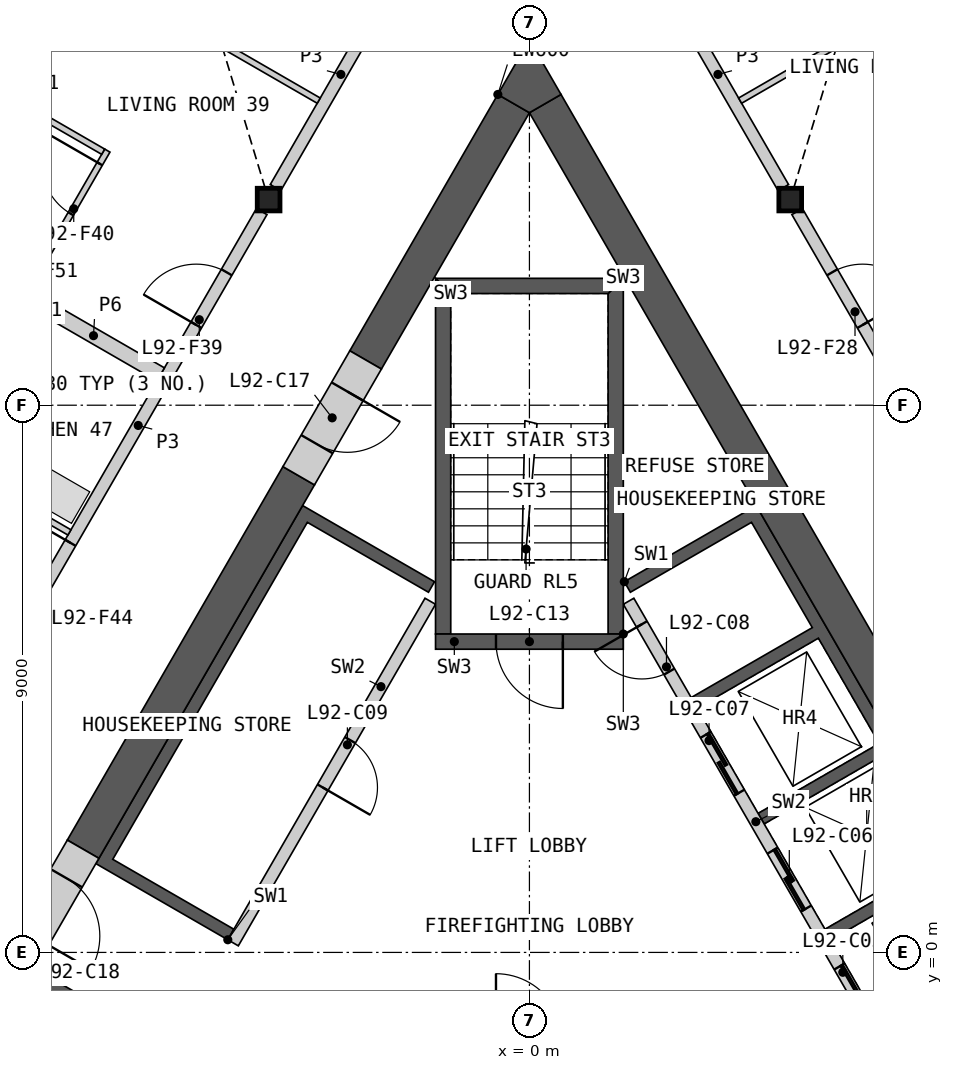
"""IFC4 building model, lengths in metres.
Left out: names, types, materials, properties, quantities, classifications, styles, units other than length and angle.
Written with IfcOpenShell. Run it as: python <this file> out.ifc"""

import sys

from ifc_helpers import new_model, si_unit, direction, frame, frame_2d, origin, origin_2d, place, context, subcontext, project, spatial, polyline, rectangle, i_section, outline, extrude, element, fill, save


model = new_model("IFC4")
c1 = context("Model", 3, precision=1e-05, world=origin(), true_north=direction((0.0, 1.0)))
c2 = subcontext(c1, "Body", "Model", "MODEL_VIEW")
j1 = project(units=[si_unit("LENGTHUNIT", "METRE"), si_unit("PLANEANGLEUNIT", "RADIAN")], contexts=[c1])
p1 = place(None, origin())
s1 = spatial("IfcSite", under=j1, at=p1, CompositionType="ELEMENT")
p2 = place(p1, origin())
s2 = spatial("IfcBuilding", under=s1, at=p2, CompositionType="ELEMENT")
p3 = place(p2, frame((0.0, 0.0, 401.8)))
s3 = spatial("IfcBuildingStorey", under=s2, at=p3, CompositionType="ELEMENT", Elevation=401.8)
for number, where, z_axis, x_axis in (
    (1, (-4.289, 12.382, 0.0), (0.0, 0.0, 1.0), (1.0, 0.0, 0.0)),
    (2, (4.289, 12.382, 0.0), (0.0, 0.0, 1.0), (1.0, 0.0, 0.0)),
):
    element("IfcColumn", number, at=place(p3, frame(where, z_axis=z_axis, x_axis=x_axis)), inside=s3, PredefinedType="COLUMN", context=c2, shape_type="SweptSolid", body=[
        extrude(i_section(OverallWidth=0.374, OverallDepth=0.372, WebThickness=0.016, FlangeThickness=0.026, at=origin_2d()), origin(), (0.0, 0.0, 1.0), 3.4),
    ])
p4 = place(p3, origin())
e3 = element("IfcWall", 3, at=p4, inside=s3, PredefinedType="SHEAR", context=c2, shape_type="SweptSolid", body=[
    extrude(outline(polyline([(1.561, 6.097), (3.731, 7.35), (8.231, -0.444), (6.061, -1.697), (5.96, -1.524), (7.952, -0.374), (6.952, 1.358), (4.96, 0.208), (4.861, 0.381), (6.852, 1.531), (5.852, 3.263), (3.861, 2.113), (3.76, 2.287), (5.752, 3.437), (4.752, 5.169), (2.76, 4.019), (2.66, 4.192), (4.652, 5.342), (3.652, 7.074), (1.66, 5.924), (1.561, 6.097)])), origin(), (0.0, 0.0, 1.0), 3.1),
])
p5 = place(p3, frame((5.817, -1.476, 0.0), z_axis=(0.0, 0.0, 1.0), x_axis=(-0.500002616675, 0.866023893041, 0.0)))
e4 = element("IfcWall", 4, at=p5, inside=s3, PredefinedType="SOLIDWALL", context=c2, shape_type="SweptSolid", body=[
    extrude(rectangle(XDim=8.373, YDim=0.2, at=frame_2d((4.187, 0.0))), origin(), (0.0, 0.0, 1.0), 3.1),
])
p6 = place(p5, frame((0.337, 0.0, 0.0)))
e5 = element("IfcOpeningElement", 5, at=p6, cuts=e4, PredefinedType="OPENING", context=c2, shape_type="SweptSolid", body=[
    extrude(rectangle(XDim=1.1, YDim=2.1, at=frame_2d((0.55, 1.05))), frame((0.0, 0.11, 0.0), z_axis=(0.0, -1.0, 0.0), x_axis=(1.0, 0.0, 0.0)), (0.0, 0.0, 1.0), 0.22),
])
p7 = place(p5, frame((2.537, 0.0, 0.0)))
e6 = element("IfcOpeningElement", 6, at=p7, cuts=e4, PredefinedType="OPENING", context=c2, shape_type="SweptSolid", body=[
    extrude(rectangle(XDim=1.1, YDim=2.1, at=frame_2d((0.55, 1.05))), frame((0.0, 0.11, 0.0), z_axis=(0.0, -1.0, 0.0), x_axis=(1.0, 0.0, 0.0)), (0.0, 0.0, 1.0), 0.22),
])
p8 = place(p5, frame((4.737, 0.0, 0.0)))
e7 = element("IfcOpeningElement", 7, at=p8, cuts=e4, PredefinedType="OPENING", context=c2, shape_type="SweptSolid", body=[
    extrude(rectangle(XDim=1.1, YDim=2.1, at=frame_2d((0.55, 1.05))), frame((0.0, 0.11, 0.0), z_axis=(0.0, -1.0, 0.0), x_axis=(1.0, 0.0, 0.0)), (0.0, 0.0, 1.0), 0.22),
])
p9 = place(p5, frame((7.037, 0.0, 0.0)))
e8 = element("IfcOpeningElement", 8, at=p9, cuts=e4, PredefinedType="OPENING", context=c2, shape_type="SweptSolid", body=[
    extrude(rectangle(XDim=0.9, YDim=2.1, at=frame_2d((0.45, 1.05))), frame((0.0, 0.11, 0.0), z_axis=(0.0, -1.0, 0.0), x_axis=(1.0, 0.0, 0.0)), (0.0, 0.0, 1.0), 0.22),
])
p10 = place(p3, origin())
e9 = element("IfcWall", 9, at=p10, inside=s3, PredefinedType="SHEAR", context=c2, shape_type="SweptSolid", body=[
    extrude(outline(polyline([(-6.061, -1.697), (-8.231, -0.444), (-8.131, -0.271), (-5.96, -1.524), (-6.061, -1.697)])), origin(), (0.0, 0.0, 1.0), 3.1),
])
p11 = place(p3, origin())
e10 = element("IfcWall", 10, at=p11, inside=s3, PredefinedType="SHEAR", context=c2, shape_type="SweptSolid", body=[
    extrude(outline(polyline([(-4.96, 0.208), (-7.131, 1.461), (-3.731, 7.35), (-1.561, 6.097), (-1.66, 5.924), (-3.652, 7.074), (-6.852, 1.531), (-4.861, 0.381), (-4.96, 0.208)])), origin(), (0.0, 0.0, 1.0), 3.1),
])
p12 = place(p3, frame((-1.631, 5.776, 0.0), z_axis=(0.0, 0.0, 1.0), x_axis=(-0.499992876559, -0.866029516466, 0.0)))
e11 = element("IfcWall", 11, at=p12, inside=s3, PredefinedType="SOLIDWALL", context=c2, shape_type="SweptSolid", body=[
    extrude(rectangle(XDim=6.486, YDim=0.2, at=frame_2d((3.243, 0.0))), origin(), (0.0, 0.0, 1.0), 3.1),
])
p13 = place(p12, frame((2.637, 0.0, 0.0)))
e12 = element("IfcOpeningElement", 12, at=p13, cuts=e11, PredefinedType="OPENING", context=c2, shape_type="SweptSolid", body=[
    extrude(rectangle(XDim=0.9, YDim=2.1, at=frame_2d((0.45, 1.05))), frame((0.0, 0.11, 0.0), z_axis=(0.0, -1.0, 0.0), x_axis=(1.0, 0.0, 0.0)), (0.0, 0.0, 1.0), 0.22),
])
p14 = place(p3, origin())
e13 = element("IfcWall", 13, at=p14, inside=s3, PredefinedType="SHEAR", context=c2, shape_type="SweptSolid", body=[
    extrude(outline(polyline([(1.544, 5.237), (1.544, 11.087), (1.294, 10.837), (1.294, 5.237), (1.544, 5.237)])), origin(), (0.0, 0.0, 1.0), 3.1),
])
p15 = place(p3, origin())
e14 = element("IfcWall", 14, at=p15, inside=s3, PredefinedType="SHEAR", context=c2, shape_type="SweptSolid", body=[
    extrude(outline(polyline([(1.544, 11.087), (-1.544, 11.087), (-1.294, 10.837), (1.294, 10.837), (1.544, 11.087)])), origin(), (0.0, 0.0, 1.0), 3.1),
])
p16 = place(p3, origin())
e15 = element("IfcWall", 15, at=p16, inside=s3, PredefinedType="SHEAR", context=c2, shape_type="SweptSolid", body=[
    extrude(outline(polyline([(-1.294, 10.837), (-1.544, 11.087), (-1.544, 5.237), (-1.294, 5.237), (-1.294, 10.837)])), origin(), (0.0, 0.0, 1.0), 3.1),
])
p17 = place(p3, frame((1.544, 5.112, 0.0), z_axis=(0.0, 0.0, 1.0), x_axis=(-1.0, 0.0, 0.0)))
e16 = element("IfcWall", 16, at=p17, inside=s3, PredefinedType="SHEAR", context=c2, shape_type="SweptSolid", body=[
    extrude(rectangle(XDim=3.088, YDim=0.25, at=frame_2d((1.544, 0.0))), origin(), (0.0, 0.0, 1.0), 3.1),
])
p18 = place(p17, frame((0.994, 0.0, 0.0)))
e17 = element("IfcOpeningElement", 17, at=p18, cuts=e16, PredefinedType="OPENING", context=c2, shape_type="SweptSolid", body=[
    extrude(rectangle(XDim=1.1, YDim=2.1, at=frame_2d((0.55, 1.05))), frame((0.0, 0.135, 0.0), z_axis=(0.0, -1.0, 0.0), x_axis=(1.0, 0.0, 0.0)), (0.0, 0.0, 1.0), 0.27),
])
p19 = place(p3, frame((8.686, -0.634, 0.0), z_axis=(0.0, 0.0, 1.0), x_axis=(-0.500004601921, 0.866022746848, 0.0)))
e18 = element("IfcWall", 18, at=p19, inside=s3, PredefinedType="SHEAR", context=c2, shape_type="SweptSolid", body=[
    extrude(rectangle(XDim=16.853, YDim=0.6, at=frame_2d((8.426, 0.0))), origin(), (0.0, 0.0, 1.0), 3.1),
])
p20 = place(p3, frame((-3.794, 7.84, 0.0), z_axis=(0.0, 0.0, 1.0), x_axis=(-0.499974747889, -0.866039982607, 0.0)))
e19 = element("IfcWall", 19, at=p20, inside=s3, PredefinedType="SHEAR", context=c2, shape_type="SweptSolid", body=[
    extrude(rectangle(XDim=7.092, YDim=0.6, at=frame_2d((3.546, 0.0))), origin(), (0.0, 0.0, 1.0), 3.1),
])
p21 = place(p3, frame((-0.26, 13.961, 0.0), z_axis=(0.0, 0.0, 1.0), x_axis=(-0.50000604952, -0.866021911064, 0.0)))
e20 = element("IfcWall", 20, at=p21, inside=s3, PredefinedType="SHEAR", context=c2, shape_type="SweptSolid", body=[
    extrude(rectangle(XDim=4.869, YDim=0.6, at=frame_2d((2.434, 0.0))), origin(), (0.0, 0.0, 1.0), 3.1),
])
p22 = place(p3, origin())
e21 = element("IfcWall", 21, at=p22, inside=s3, PredefinedType="SHEAR", context=c2, shape_type="SweptSolid", body=[
    extrude(outline(polyline([(-0.52, 14.111), (0.0, 15.011), (0.52, 14.111), (0.0, 13.811), (-0.52, 14.111)])), origin(), (0.0, 0.0, 1.0), 3.1),
])
p23 = place(p3, frame((-2.694, 9.745, 0.0), z_axis=(0.0, 0.0, 1.0), x_axis=(-0.50002983664, -0.866008176907, 0.0)))
e22 = element("IfcWall", 22, at=p23, inside=s3, PredefinedType="SHEAR", context=c2, shape_type="SweptSolid", body=[
    extrude(rectangle(XDim=2.2, YDim=0.6, at=frame_2d((1.1, 0.0))), origin(), (0.0, 0.0, 1.0), 3.1),
])
p24 = place(p23, frame((0.6, 0.0, 0.0)))
e23 = element("IfcOpeningElement", 23, at=p24, cuts=e22, PredefinedType="OPENING", context=c2, shape_type="SweptSolid", body=[
    extrude(rectangle(XDim=1.0, YDim=2.1, at=frame_2d((0.5, 1.05))), frame((0.0, 0.31, 0.0), z_axis=(0.0, -1.0, 0.0), x_axis=(1.0, 0.0, 0.0)), (0.0, 0.0, 1.0), 0.62),
])
p25 = place(p3, frame((-7.34, 1.698, 0.0), z_axis=(0.0, 0.0, 1.0), x_axis=(-0.50002983664, -0.866008176907, 0.0)))
e24 = element("IfcWall", 24, at=p25, inside=s3, PredefinedType="SHEAR", context=c2, shape_type="SweptSolid", body=[
    extrude(rectangle(XDim=2.2, YDim=0.6, at=frame_2d((1.1, 0.0))), origin(), (0.0, 0.0, 1.0), 3.1),
])
p26 = place(p25, frame((0.55, 0.0, 0.0)))
e25 = element("IfcOpeningElement", 25, at=p26, cuts=e24, PredefinedType="OPENING", context=c2, shape_type="SweptSolid", body=[
    extrude(rectangle(XDim=1.1, YDim=2.1, at=frame_2d((0.55, 1.05))), frame((0.0, 0.31, 0.0), z_axis=(0.0, -1.0, 0.0), x_axis=(1.0, 0.0, 0.0)), (0.0, 0.0, 1.0), 0.62),
])
p27 = place(p3, frame((4.403, 12.185, 0.0), z_axis=(0.0, 0.0, 1.0), x_axis=(0.499992155518, -0.866029932751, 0.0)))
e26 = element("IfcWall", 26, at=p27, inside=s3, PredefinedType="PARTITIONING", context=c2, shape_type="SweptSolid", body=[
    extrude(rectangle(XDim=8.123, YDim=0.2, at=frame_2d((4.062, 0.0))), origin(), (0.0, 0.0, 1.0), 3.1),
])
p28 = place(p27, frame((3.963, 0.0, 0.0)))
e27 = element("IfcOpeningElement", 27, at=p28, cuts=e26, PredefinedType="OPENING", context=c2, shape_type="SweptSolid", body=[
    extrude(rectangle(XDim=1.0, YDim=2.1, at=frame_2d((0.5, 1.05))), frame((0.0, 0.11, 0.0), z_axis=(0.0, -1.0, 0.0), x_axis=(1.0, 0.0, 0.0)), (0.0, 0.0, 1.0), 0.22),
])
p29 = place(p27, frame((1.153, 0.0, 0.0)))
e28 = element("IfcOpeningElement", 28, at=p29, cuts=e26, PredefinedType="OPENING", context=c2, shape_type="SweptSolid", body=[
    extrude(rectangle(XDim=1.0, YDim=2.1, at=frame_2d((0.5, 1.05))), frame((0.0, 0.11, 0.0), z_axis=(0.0, -1.0, 0.0), x_axis=(1.0, 0.0, 0.0)), (0.0, 0.0, 1.0), 0.22),
])
p30 = place(p3, frame((-8.465, 5.15, 0.0), z_axis=(0.0, 0.0, 1.0), x_axis=(0.499992155518, 0.866029932751, 0.0)))
e29 = element("IfcWall", 29, at=p30, inside=s3, PredefinedType="PARTITIONING", context=c2, shape_type="SweptSolid", body=[
    extrude(rectangle(XDim=8.123, YDim=0.2, at=frame_2d((4.062, 0.0))), origin(), (0.0, 0.0, 1.0), 3.1),
])
p31 = place(p30, frame((5.97, 0.0, 0.0)))
e30 = element("IfcOpeningElement", 30, at=p31, cuts=e29, PredefinedType="OPENING", context=c2, shape_type="SweptSolid", body=[
    extrude(rectangle(XDim=1.0, YDim=2.1, at=frame_2d((0.5, 1.05))), frame((0.0, 0.11, 0.0), z_axis=(0.0, -1.0, 0.0), x_axis=(1.0, 0.0, 0.0)), (0.0, 0.0, 1.0), 0.22),
])
p32 = place(p30, frame((0.832, 0.0, 0.0)))
e31 = element("IfcOpeningElement", 31, at=p32, cuts=e29, PredefinedType="OPENING", context=c2, shape_type="SweptSolid", body=[
    extrude(rectangle(XDim=1.0, YDim=2.1, at=frame_2d((0.5, 1.05))), frame((0.0, 0.11, 0.0), z_axis=(0.0, -1.0, 0.0), x_axis=(1.0, 0.0, 0.0)), (0.0, 0.0, 1.0), 0.22),
])
for number, where, z_axis, x_axis in (
    (32, (2.025, 16.303, 0.0), (0.0, 0.0, 1.0), (0.5, -0.866, 0.0)),
    (33, (-4.176, 12.579, 0.0), (0.0, 0.0, 1.0), (0.5, 0.866, 0.0)),
):
    element("IfcWall", number, at=place(p3, frame(where, z_axis=z_axis, x_axis=x_axis)), inside=s3, PredefinedType="PARTITIONING", context=c2, shape_type="SweptSolid", body=[
        extrude(rectangle(XDim=4.3, YDim=0.2, at=frame_2d((2.15, 0.0))), origin(), (0.0, 0.0, 1.0), 3.1),
    ])
p33 = place(p3, frame((-8.273, 10.781, 0.0), z_axis=(0.0, 0.0, 1.0), x_axis=(0.866030925526, -0.499990435942, 0.0)))
e34 = element("IfcWall", 34, at=p33, inside=s3, PredefinedType="PARTITIONING", context=c2, shape_type="SweptSolid", body=[
    extrude(rectangle(XDim=2.55, YDim=0.25, at=frame_2d((1.275, 0.0))), origin(), (0.0, 0.0, 1.0), 2.33),
])
p34 = place(p3, frame((-13.669, 19.9, 0.0), z_axis=(0.0, 0.0, 1.0), x_axis=(0.866032376801, -0.499987922186, 0.0)))
e35 = element("IfcWall", 35, at=p34, inside=s3, PredefinedType="PARTITIONING", context=c2, shape_type="SweptSolid", body=[
    extrude(rectangle(XDim=11.782, YDim=0.1, at=frame_2d((5.891, 0.0))), origin(), (0.0, 0.0, 1.0), 2.33),
])
p35 = place(p34, frame((3.661, 0.0, 0.0)))
e36 = element("IfcOpeningElement", 36, at=p35, cuts=e35, PredefinedType="OPENING", context=c2, shape_type="SweptSolid", body=[
    extrude(rectangle(XDim=0.95, YDim=2.1, at=frame_2d((0.475, 1.05))), frame((0.0, 0.06, 0.0), z_axis=(0.0, -1.0, 0.0), x_axis=(1.0, 0.0, 0.0)), (0.0, 0.0, 1.0), 0.12),
])
p36 = place(p3, frame((3.465, 14.01, 0.0), z_axis=(0.0, 0.0, 1.0), x_axis=(0.866032376801, 0.499987922186, 0.0)))
e37 = element("IfcWall", 37, at=p36, inside=s3, PredefinedType="PARTITIONING", context=c2, shape_type="SweptSolid", body=[
    extrude(rectangle(XDim=11.782, YDim=0.1, at=frame_2d((5.891, 0.0))), origin(), (0.0, 0.0, 1.0), 2.33),
])
p37 = place(p36, frame((7.171, 0.0, 0.0)))
e38 = element("IfcOpeningElement", 38, at=p37, cuts=e37, PredefinedType="OPENING", context=c2, shape_type="SweptSolid", body=[
    extrude(rectangle(XDim=0.95, YDim=2.1, at=frame_2d((0.475, 1.05))), frame((0.0, 0.06, 0.0), z_axis=(0.0, -1.0, 0.0), x_axis=(1.0, 0.0, 0.0)), (0.0, 0.0, 1.0), 0.12),
])
p38 = place(p3, frame((-12.718, 9.883, 0.0), z_axis=(0.0, 0.0, 1.0), x_axis=(0.866017493347, -0.500013701029, 0.0)))
e39 = element("IfcWall", 39, at=p38, inside=s3, PredefinedType="PARTITIONING", context=c2, shape_type="SweptSolid", body=[
    extrude(rectangle(XDim=5.95, YDim=0.1, at=frame_2d((2.975, 0.0))), origin(), (0.0, 0.0, 1.0), 2.33),
])
p39 = place(p3, frame((-9.692, 8.425, 0.0), z_axis=(0.0, 0.0, 1.0), x_axis=(0.499996545922, 0.866027397988, 0.0)))
e40 = element("IfcWall", 40, at=p39, inside=s3, PredefinedType="PARTITIONING", context=c2, shape_type="SweptSolid", body=[
    extrude(rectangle(XDim=5.5, YDim=0.1, at=frame_2d((2.75, 0.0))), origin(), (0.0, 0.0, 1.0), 2.33),
])
p40 = place(p39, frame((4.3, 0.0, 0.0)))
e41 = element("IfcOpeningElement", 41, at=p40, cuts=e40, PredefinedType="OPENING", context=c2, shape_type="SweptSolid", body=[
    extrude(rectangle(XDim=0.95, YDim=2.1, at=frame_2d((0.475, 1.05))), frame((0.0, 0.06, 0.0), z_axis=(0.0, -1.0, 0.0), x_axis=(1.0, 0.0, 0.0)), (0.0, 0.0, 1.0), 0.12),
])
p41 = place(p39, frame((1.465, 0.0, 0.0)))
e42 = element("IfcOpeningElement", 42, at=p41, cuts=e40, PredefinedType="OPENING", context=c2, shape_type="SweptSolid", body=[
    extrude(rectangle(XDim=0.95, YDim=2.1, at=frame_2d((0.475, 1.05))), frame((0.0, 0.06, 0.0), z_axis=(0.0, -1.0, 0.0), x_axis=(1.0, 0.0, 0.0)), (0.0, 0.0, 1.0), 0.12),
])
p42 = place(p3, frame((-9.348, 14.519, 0.0), z_axis=(0.0, 0.0, 1.0), x_axis=(0.866059108428, -0.4999416173, 0.0)))
e43 = element("IfcWall", 43, at=p42, inside=s3, PredefinedType="PARTITIONING", context=c2, shape_type="SweptSolid", body=[
    extrude(rectangle(XDim=2.7, YDim=0.1, at=frame_2d((1.35, 0.0))), origin(), (0.0, 0.0, 1.0), 2.33),
])
p43 = place(p6, origin())
e44 = element("IfcDoor", 44, at=p43, inside=s3, OperationType="SLIDING_TO_LEFT", PredefinedType="DOOR", context=c2, shape_type="SweptSolid", body=[
    extrude(rectangle(XDim=1.1, YDim=2.1, at=frame_2d((0.55, 1.05))), frame((0.0, 0.025, 0.0), z_axis=(0.0, -1.0, 0.0), x_axis=(1.0, 0.0, 0.0)), (0.0, 0.0, 1.0), 0.05),
])
fill(e5, e44)
p44 = place(p7, origin())
e45 = element("IfcDoor", 45, at=p44, inside=s3, OperationType="SLIDING_TO_LEFT", PredefinedType="DOOR", context=c2, shape_type="SweptSolid", body=[
    extrude(rectangle(XDim=1.1, YDim=2.1, at=frame_2d((0.55, 1.05))), frame((0.0, 0.025, 0.0), z_axis=(0.0, -1.0, 0.0), x_axis=(1.0, 0.0, 0.0)), (0.0, 0.0, 1.0), 0.05),
])
fill(e6, e45)
p45 = place(p8, origin())
e46 = element("IfcDoor", 46, at=p45, inside=s3, OperationType="SLIDING_TO_LEFT", PredefinedType="DOOR", context=c2, shape_type="SweptSolid", body=[
    extrude(rectangle(XDim=1.1, YDim=2.1, at=frame_2d((0.55, 1.05))), frame((0.0, 0.025, 0.0), z_axis=(0.0, -1.0, 0.0), x_axis=(1.0, 0.0, 0.0)), (0.0, 0.0, 1.0), 0.05),
])
fill(e7, e46)
p46 = place(p9, origin())
e47 = element("IfcDoor", 47, at=p46, inside=s3, OperationType="SINGLE_SWING_RIGHT", PredefinedType="DOOR", context=c2, shape_type="SweptSolid", body=[
    extrude(rectangle(XDim=0.9, YDim=2.1, at=frame_2d((0.45, 1.05))), frame((0.0, 0.025, 0.0), z_axis=(0.0, -1.0, 0.0), x_axis=(1.0, 0.0, 0.0)), (0.0, 0.0, 1.0), 0.05),
])
fill(e8, e47)
p47 = place(p13, origin())
e48 = element("IfcDoor", 48, at=p47, inside=s3, OperationType="SINGLE_SWING_RIGHT", PredefinedType="DOOR", context=c2, shape_type="SweptSolid", body=[
    extrude(rectangle(XDim=0.9, YDim=2.1, at=frame_2d((0.45, 1.05))), frame((0.0, 0.025, 0.0), z_axis=(0.0, -1.0, 0.0), x_axis=(1.0, 0.0, 0.0)), (0.0, 0.0, 1.0), 0.05),
])
fill(e12, e48)
p48 = place(p18, origin())
e49 = element("IfcDoor", 49, at=p48, inside=s3, OperationType="SINGLE_SWING_LEFT", PredefinedType="DOOR", context=c2, shape_type="SweptSolid", body=[
    extrude(rectangle(XDim=1.1, YDim=2.1, at=frame_2d((0.55, 1.05))), frame((0.0, 0.025, 0.0), z_axis=(0.0, -1.0, 0.0), x_axis=(1.0, 0.0, 0.0)), (0.0, 0.0, 1.0), 0.05),
])
fill(e17, e49)
p49 = place(p24, origin())
e50 = element("IfcDoor", 50, at=p49, inside=s3, OperationType="SINGLE_SWING_LEFT", PredefinedType="DOOR", context=c2, shape_type="SweptSolid", body=[
    extrude(rectangle(XDim=1.0, YDim=2.1, at=frame_2d((0.5, 1.05))), frame((0.0, 0.055, 0.0), z_axis=(0.0, -1.0, 0.0), x_axis=(1.0, 0.0, 0.0)), (0.0, 0.0, 1.0), 0.05),
])
fill(e23, e50)
p50 = place(p26, origin())
e51 = element("IfcDoor", 51, at=p50, inside=s3, OperationType="SINGLE_SWING_RIGHT", PredefinedType="DOOR", context=c2, shape_type="SweptSolid", body=[
    extrude(rectangle(XDim=1.1, YDim=2.1, at=frame_2d((0.55, 1.05))), frame((0.0, 0.055, 0.0), z_axis=(0.0, -1.0, 0.0), x_axis=(1.0, 0.0, 0.0)), (0.0, 0.0, 1.0), 0.05),
])
fill(e25, e51)
p51 = place(p29, origin())
e52 = element("IfcDoor", 52, at=p51, inside=s3, OperationType="SINGLE_SWING_RIGHT", PredefinedType="DOOR", context=c2, shape_type="SweptSolid", body=[
    extrude(rectangle(XDim=1.0, YDim=2.1, at=frame_2d((0.5, 1.05))), frame((0.0, 0.025, 0.0), z_axis=(0.0, -1.0, 0.0), x_axis=(1.0, 0.0, 0.0)), (0.0, 0.0, 1.0), 0.05),
])
fill(e28, e52)
p52 = place(p31, origin())
e53 = element("IfcDoor", 53, at=p52, inside=s3, OperationType="SINGLE_SWING_LEFT", PredefinedType="DOOR", context=c2, shape_type="SweptSolid", body=[
    extrude(rectangle(XDim=1.0, YDim=2.1, at=frame_2d((0.5, 1.05))), frame((0.0, 0.025, 0.0), z_axis=(0.0, -1.0, 0.0), x_axis=(1.0, 0.0, 0.0)), (0.0, 0.0, 1.0), 0.05),
])
fill(e30, e53)
p53 = place(p40, origin())
e54 = element("IfcDoor", 54, at=p53, inside=s3, OperationType="SINGLE_SWING_RIGHT", PredefinedType="DOOR", context=c2, shape_type="SweptSolid", body=[
    extrude(rectangle(XDim=0.95, YDim=2.1, at=frame_2d((0.475, 1.05))), frame((0.0, 0.025, 0.0), z_axis=(0.0, -1.0, 0.0), x_axis=(1.0, 0.0, 0.0)), (0.0, 0.0, 1.0), 0.05),
])
fill(e41, e54)
p54 = place(p32, origin())
e55 = element("IfcDoor", 55, at=p54, inside=s3, OperationType="SINGLE_SWING_RIGHT", PredefinedType="DOOR", context=c2, shape_type="SweptSolid", body=[
    extrude(rectangle(XDim=1.0, YDim=2.1, at=frame_2d((0.5, 1.05))), frame((0.0, 0.025, 0.0), z_axis=(0.0, -1.0, 0.0), x_axis=(1.0, 0.0, 0.0)), (0.0, 0.0, 1.0), 0.05),
])
fill(e31, e55)
save(model, sys.argv[1])
